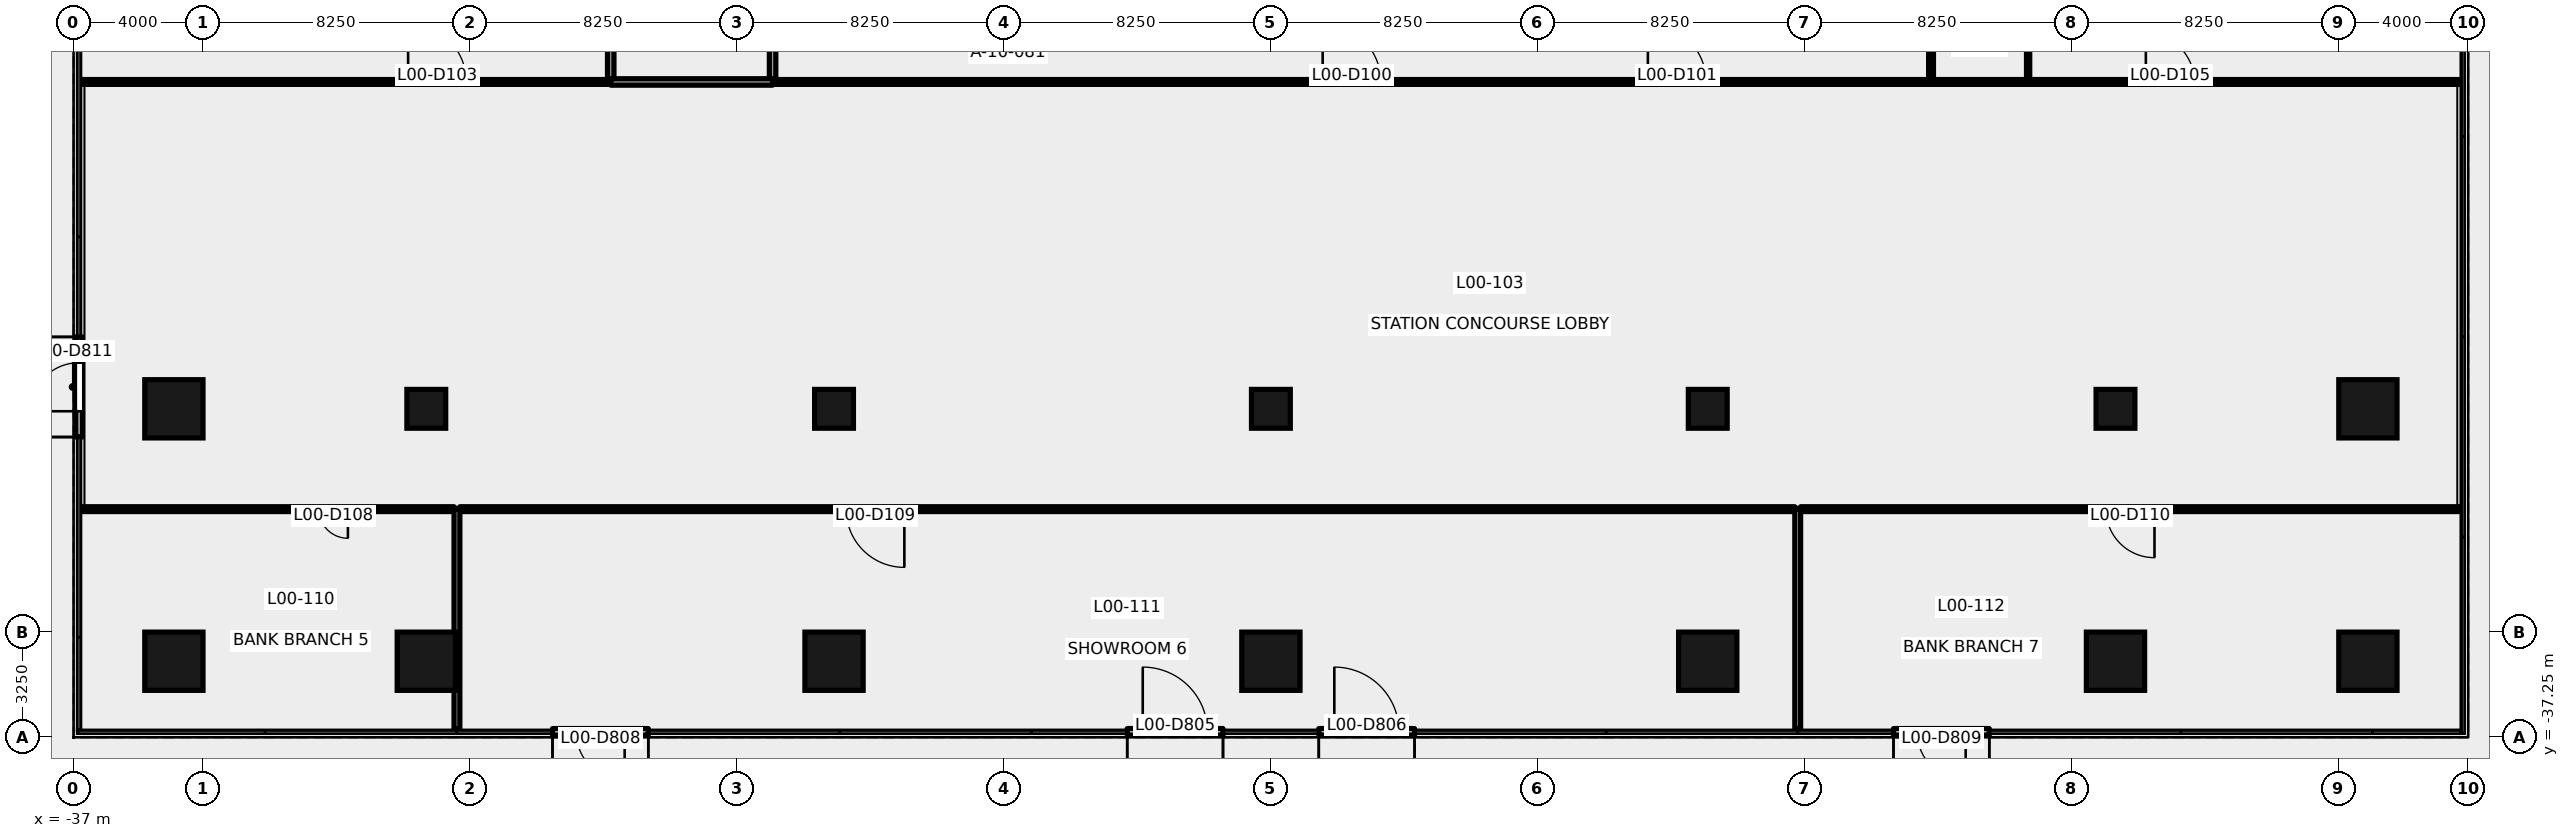
"""IFC4 building model, lengths in metres.
Left out: names, types, materials, properties, quantities, classifications, styles, units other than length and angle.
Written with IfcOpenShell. Run it as: python <this file> out.ifc"""

import sys

from ifc_helpers import new_model, si_unit, direction, frame, frame_2d, origin, origin_2d, place, context, subcontext, project, spatial, rectangle, extrude, element, fill, save


model = new_model("IFC4")
c1 = context("Model", 3, precision=1e-05, world=origin(), true_north=direction((0.0, 1.0)))
c2 = subcontext(c1, "Body", "Model", "MODEL_VIEW")
j1 = project(units=[si_unit("LENGTHUNIT", "METRE"), si_unit("PLANEANGLEUNIT", "RADIAN")], contexts=[c1])
p1 = place(None, origin())
s1 = spatial("IfcSite", under=j1, at=p1, CompositionType="ELEMENT")
p2 = place(p1, origin())
s2 = spatial("IfcBuilding", under=s1, at=p2, CompositionType="ELEMENT")
p3 = place(p2, origin())
s3 = spatial("IfcBuildingStorey", under=s2, at=p3, CompositionType="ELEMENT", Elevation=0.0)
for number, where, z_axis, x_axis in (
    (1, (-33.9, -34.9, -0.2), (0.0, 0.0, 1.0), (1.0, 0.0, 0.0)),
    (2, (33.9, -34.9, -0.2), (0.0, 0.0, 1.0), (1.0, 0.0, 0.0)),
    (3, (-26.1, -34.9, -0.2), (0.0, 0.0, 1.0), (1.0, 0.0, 0.0)),
    (4, (-13.5, -34.9, -0.2), (0.0, 0.0, 1.0), (1.0, 0.0, 0.0)),
    (5, (0.0, -34.9, -0.2), (0.0, 0.0, 1.0), (1.0, 0.0, 0.0)),
    (6, (13.5, -34.9, -0.2), (0.0, 0.0, 1.0), (1.0, 0.0, 0.0)),
    (7, (26.1, -34.9, -0.2), (0.0, 0.0, 1.0), (1.0, 0.0, 0.0)),
    (8, (-33.9, -27.1, -0.2), (0.0, 0.0, 1.0), (0.0, 1.0, 0.0)),
    (9, (33.9, -27.1, -0.2), (0.0, 0.0, 1.0), (0.0, 1.0, 0.0)),
):
    element("IfcColumn", number, at=place(p3, frame(where, z_axis=z_axis, x_axis=x_axis)), inside=s3, PredefinedType="COLUMN", context=c2, shape_type="SweptSolid", body=[
        extrude(rectangle(XDim=1.8, YDim=1.8, at=origin_2d()), origin(), (0.0, 0.0, 1.0), 7.2),
    ])
for number, where, z_axis, x_axis in (
    (10, (-26.1, -27.1, -0.2), (0.0, 0.0, 1.0), (1.0, 0.0, 0.0)),
    (11, (-13.5, -27.1, -0.2), (0.0, 0.0, 1.0), (1.0, 0.0, 0.0)),
    (12, (0.0, -27.1, -0.2), (0.0, 0.0, 1.0), (1.0, 0.0, 0.0)),
    (13, (13.5, -27.1, -0.2), (0.0, 0.0, 1.0), (1.0, 0.0, 0.0)),
    (14, (26.1, -27.1, -0.2), (0.0, 0.0, 1.0), (1.0, 0.0, 0.0)),
):
    element("IfcColumn", number, at=place(p3, frame(where, z_axis=z_axis, x_axis=x_axis)), inside=s3, PredefinedType="COLUMN", context=c2, shape_type="SweptSolid", body=[
        extrude(rectangle(XDim=1.2, YDim=1.2, at=origin_2d()), origin(), (0.0, 0.0, 1.0), 7.2),
    ])
p4 = place(p3, frame((-36.83, -27.972, 0.0), z_axis=(0.0, 0.0, 1.0), x_axis=(0.0, 1.0, 0.0)))
e15 = element("IfcWall", 15, at=p4, inside=s3, PredefinedType="SOLIDWALL", context=c2, shape_type="SweptSolid", body=[
    extrude(rectangle(XDim=3.094, YDim=0.2, at=frame_2d((1.547, 0.0))), origin(), (0.0, 0.0, 1.0), 7.0),
])
p5 = place(p4, frame((0.797, 0.0, 0.0)))
e16 = element("IfcOpeningElement", 16, at=p5, cuts=e15, PredefinedType="OPENING", context=c2, shape_type="SweptSolid", body=[
    extrude(rectangle(XDim=1.5, YDim=2.4, at=frame_2d((0.75, 1.2))), frame((0.0, 0.111, 0.0), z_axis=(0.0, -1.0, 0.0), x_axis=(1.0, 0.0, 0.0)), (0.0, 0.0, 1.0), 0.221),
])
p6 = place(p3, frame((-19.24, -37.08, 0.0), z_axis=(0.0, 0.0, 1.0), x_axis=(-1.0, 0.0, 0.0)))
e17 = element("IfcWall", 17, at=p6, inside=s3, PredefinedType="SOLIDWALL", context=c2, shape_type="SweptSolid", body=[
    extrude(rectangle(XDim=2.96, YDim=0.2, at=frame_2d((1.48, 0.0))), origin(), (0.0, 0.0, 1.0), 7.0),
])
p7 = place(p6, frame((0.73, 0.0, 0.0)))
e18 = element("IfcOpeningElement", 18, at=p7, cuts=e17, PredefinedType="OPENING", context=c2, shape_type="SweptSolid", body=[
    extrude(rectangle(XDim=1.5, YDim=2.4, at=frame_2d((0.75, 1.2))), frame((0.0, 0.111, 0.0), z_axis=(0.0, -1.0, 0.0), x_axis=(1.0, 0.0, 0.0)), (0.0, 0.0, 1.0), 0.221),
])
p8 = place(p3, frame((-4.44, -37.08, 0.0), z_axis=(0.0, 0.0, 1.0), x_axis=(1.0, 0.0, 0.0)))
e19 = element("IfcWall", 19, at=p8, inside=s3, PredefinedType="SOLIDWALL", context=c2, shape_type="SweptSolid", body=[
    extrude(rectangle(XDim=2.96, YDim=0.2, at=frame_2d((1.48, 0.0))), origin(), (0.0, 0.0, 1.0), 7.0),
])
p9 = place(p8, frame((0.48, 0.0, 0.0)))
e20 = element("IfcOpeningElement", 20, at=p9, cuts=e19, PredefinedType="OPENING", context=c2, shape_type="SweptSolid", body=[
    extrude(rectangle(XDim=2.0, YDim=2.4, at=frame_2d((1.0, 1.2))), frame((0.0, 0.111, 0.0), z_axis=(0.0, -1.0, 0.0), x_axis=(1.0, 0.0, 0.0)), (0.0, 0.0, 1.0), 0.221),
])
p10 = place(p3, frame((1.48, -37.08, 0.0), z_axis=(0.0, 0.0, 1.0), x_axis=(1.0, 0.0, 0.0)))
e21 = element("IfcWall", 21, at=p10, inside=s3, PredefinedType="SOLIDWALL", context=c2, shape_type="SweptSolid", body=[
    extrude(rectangle(XDim=2.96, YDim=0.2, at=frame_2d((1.48, 0.0))), origin(), (0.0, 0.0, 1.0), 7.0),
])
p11 = place(p10, frame((0.48, 0.0, 0.0)))
e22 = element("IfcOpeningElement", 22, at=p11, cuts=e21, PredefinedType="OPENING", context=c2, shape_type="SweptSolid", body=[
    extrude(rectangle(XDim=2.0, YDim=2.4, at=frame_2d((1.0, 1.2))), frame((0.0, 0.111, 0.0), z_axis=(0.0, -1.0, 0.0), x_axis=(1.0, 0.0, 0.0)), (0.0, 0.0, 1.0), 0.221),
])
p12 = place(p3, frame((22.2, -37.08, 0.0), z_axis=(0.0, 0.0, 1.0), x_axis=(-1.0, 0.0, 0.0)))
e23 = element("IfcWall", 23, at=p12, inside=s3, PredefinedType="SOLIDWALL", context=c2, shape_type="SweptSolid", body=[
    extrude(rectangle(XDim=2.96, YDim=0.2, at=frame_2d((1.48, 0.0))), origin(), (0.0, 0.0, 1.0), 7.0),
])
p13 = place(p12, frame((0.73, 0.0, 0.0)))
e24 = element("IfcOpeningElement", 24, at=p13, cuts=e23, PredefinedType="OPENING", context=c2, shape_type="SweptSolid", body=[
    extrude(rectangle(XDim=1.5, YDim=2.4, at=frame_2d((0.75, 1.2))), frame((0.0, 0.111, 0.0), z_axis=(0.0, -1.0, 0.0), x_axis=(1.0, 0.0, 0.0)), (0.0, 0.0, 1.0), 0.221),
])
p14 = place(p3, frame((-15.399, -16.9, 0.0), z_axis=(0.0, 0.0, 1.0), x_axis=(0.0, 1.0, 0.0)))
e25 = element("IfcWall", 25, at=p14, inside=s3, PredefinedType="PARTITIONING", context=c2, shape_type="SweptSolid", body=[
    extrude(rectangle(XDim=4.3, YDim=0.2, at=frame_2d((2.15, 0.0))), origin(), (0.0, 0.0, 1.0), 6.0),
])
p15 = place(p3, frame((-15.4, -17.0, 0.0), z_axis=(0.0, 0.0, 1.0), x_axis=(1.0, 0.0, 0.0)))
e26 = element("IfcWall", 26, at=p15, inside=s3, PredefinedType="PARTITIONING", context=c2, shape_type="SweptSolid", body=[
    extrude(rectangle(XDim=35.8, YDim=0.15, at=frame_2d((17.9, 0.0))), origin(), (0.0, 0.0, 1.0), 6.0),
])
p16 = place(p15, frame((17.0, 0.0, 0.0)))
e27 = element("IfcOpeningElement", 27, at=p16, cuts=e26, PredefinedType="OPENING", context=c2, shape_type="SweptSolid", body=[
    extrude(rectangle(XDim=1.8, YDim=2.1, at=frame_2d((0.9, 1.05))), frame((0.0, 0.085, 0.0), z_axis=(0.0, -1.0, 0.0), x_axis=(1.0, 0.0, 0.0)), (0.0, 0.0, 1.0), 0.171),
])
p17 = place(p15, frame((27.05, 0.0, 0.0)))
e28 = element("IfcOpeningElement", 28, at=p17, cuts=e26, PredefinedType="OPENING", context=c2, shape_type="SweptSolid", body=[
    extrude(rectangle(XDim=1.8, YDim=2.1, at=frame_2d((0.9, 1.05))), frame((0.0, 0.085, 0.0), z_axis=(0.0, -1.0, 0.0), x_axis=(1.0, 0.0, 0.0)), (0.0, 0.0, 1.0), 0.171),
])
p18 = place(p3, frame((20.4, -10.979, 0.0), z_axis=(0.0, 0.0, 1.0), x_axis=(0.0, -1.0, 0.0)))
e29 = element("IfcWall", 29, at=p18, inside=s3, PredefinedType="PARTITIONING", context=c2, shape_type="SweptSolid", body=[
    extrude(rectangle(XDim=5.946, YDim=0.15, at=frame_2d((2.973, 0.0))), origin(), (0.0, 0.0, 1.0), 6.0),
])
p19 = place(p3, frame((-15.4, -17.0, 0.0), z_axis=(0.0, 0.0, 1.0), x_axis=(-1.0, 0.0, 0.0)))
e30 = element("IfcWall", 30, at=p19, inside=s3, PredefinedType="PARTITIONING", context=c2, shape_type="SweptSolid", body=[
    extrude(rectangle(XDim=5.0, YDim=0.2, at=frame_2d((2.5, 0.0))), origin(), (0.0, 0.0, 1.0), 6.39),
])
p20 = place(p3, frame((-20.401, -16.9, 0.0), z_axis=(0.0, 0.0, 1.0), x_axis=(0.0, 1.0, 0.0)))
e31 = element("IfcWall", 31, at=p20, inside=s3, PredefinedType="PARTITIONING", context=c2, shape_type="SweptSolid", body=[
    extrude(rectangle(XDim=4.3, YDim=0.2, at=frame_2d((2.15, 0.0))), origin(), (0.0, 0.0, 1.0), 6.0),
])
p21 = place(p3, frame((-36.74, -17.0, 0.0), z_axis=(0.0, 0.0, 1.0), x_axis=(1.0, 0.0, 0.0)))
e32 = element("IfcWall", 32, at=p21, inside=s3, PredefinedType="PARTITIONING", context=c2, shape_type="SweptSolid", body=[
    extrude(rectangle(XDim=16.34, YDim=0.15, at=frame_2d((8.17, 0.0))), origin(), (0.0, 0.0, 1.0), 6.0),
])
p22 = place(p21, frame((10.078, 0.0, 0.0)))
e33 = element("IfcOpeningElement", 33, at=p22, cuts=e32, PredefinedType="OPENING", context=c2, shape_type="SweptSolid", body=[
    extrude(rectangle(XDim=1.8, YDim=2.1, at=frame_2d((0.9, 1.05))), frame((0.0, 0.085, 0.0), z_axis=(0.0, -1.0, 0.0), x_axis=(1.0, 0.0, 0.0)), (0.0, 0.0, 1.0), 0.171),
])
p23 = place(p3, frame((23.38, -17.0, 0.0), z_axis=(0.0, 0.0, 1.0), x_axis=(1.0, 0.0, 0.0)))
e34 = element("IfcWall", 34, at=p23, inside=s3, PredefinedType="PARTITIONING", context=c2, shape_type="SweptSolid", body=[
    extrude(rectangle(XDim=13.36, YDim=0.15, at=frame_2d((6.68, 0.0))), origin(), (0.0, 0.0, 1.0), 6.0),
])
p24 = place(p23, frame((3.658, 0.0, 0.0)))
e35 = element("IfcOpeningElement", 35, at=p24, cuts=e34, PredefinedType="OPENING", context=c2, shape_type="SweptSolid", body=[
    extrude(rectangle(XDim=1.5, YDim=2.1, at=frame_2d((0.75, 1.05))), frame((0.0, 0.085, 0.0), z_axis=(0.0, -1.0, 0.0), x_axis=(1.0, 0.0, 0.0)), (0.0, 0.0, 1.0), 0.171),
])
p25 = place(p3, frame((20.4, -17.0, 0.0), z_axis=(0.0, 0.0, 1.0), x_axis=(1.0, 0.0, 0.0)))
e36 = element("IfcWall", 36, at=p25, inside=s3, PredefinedType="PARTITIONING", context=c2, shape_type="SweptSolid", body=[
    extrude(rectangle(XDim=2.98, YDim=0.15, at=frame_2d((1.49, 0.0))), origin(), (0.0, 0.0, 1.0), 6.39),
])
p26 = place(p3, frame((-25.243, -30.2, 0.0), z_axis=(0.0, 0.0, 1.0), x_axis=(-1.0, 0.0, 0.0)))
e37 = element("IfcWall", 37, at=p26, inside=s3, PredefinedType="PARTITIONING", context=c2, shape_type="SweptSolid", body=[
    extrude(rectangle(XDim=11.497, YDim=0.15, at=frame_2d((5.749, 0.0))), origin(), (0.0, 0.0, 1.0), 6.0),
])
p27 = place(p26, frame((3.279, 0.0, 0.0)))
e38 = element("IfcOpeningElement", 38, at=p27, cuts=e37, PredefinedType="OPENING", context=c2, shape_type="SweptSolid", body=[
    extrude(rectangle(XDim=0.9, YDim=2.1, at=frame_2d((0.45, 1.05))), frame((0.0, 0.085, 0.0), z_axis=(0.0, -1.0, 0.0), x_axis=(1.0, 0.0, 0.0)), (0.0, 0.0, 1.0), 0.171),
])
p28 = place(p3, frame((16.19, -30.2, 0.0), z_axis=(0.0, 0.0, 1.0), x_axis=(-1.0, 0.0, 0.0)))
e39 = element("IfcWall", 39, at=p28, inside=s3, PredefinedType="PARTITIONING", context=c2, shape_type="SweptSolid", body=[
    extrude(rectangle(XDim=41.253, YDim=0.15, at=frame_2d((20.626, 0.0))), origin(), (0.0, 0.0, 1.0), 6.0),
])
p29 = place(p28, frame((27.517, 0.0, 0.0)))
e40 = element("IfcOpeningElement", 40, at=p29, cuts=e39, PredefinedType="OPENING", context=c2, shape_type="SweptSolid", body=[
    extrude(rectangle(XDim=1.8, YDim=2.1, at=frame_2d((0.9, 1.05))), frame((0.0, 0.085, 0.0), z_axis=(0.0, -1.0, 0.0), x_axis=(1.0, 0.0, 0.0)), (0.0, 0.0, 1.0), 0.171),
])
p30 = place(p3, frame((36.74, -30.2, 0.0), z_axis=(0.0, 0.0, 1.0), x_axis=(-1.0, 0.0, 0.0)))
e41 = element("IfcWall", 41, at=p30, inside=s3, PredefinedType="PARTITIONING", context=c2, shape_type="SweptSolid", body=[
    extrude(rectangle(XDim=20.37, YDim=0.15, at=frame_2d((10.185, 0.0))), origin(), (0.0, 0.0, 1.0), 6.0),
])
p31 = place(p30, frame((9.435, 0.0, 0.0)))
e42 = element("IfcOpeningElement", 42, at=p31, cuts=e41, PredefinedType="OPENING", context=c2, shape_type="SweptSolid", body=[
    extrude(rectangle(XDim=1.5, YDim=2.1, at=frame_2d((0.75, 1.05))), frame((0.0, 0.085, 0.0), z_axis=(0.0, -1.0, 0.0), x_axis=(1.0, 0.0, 0.0)), (0.0, 0.0, 1.0), 0.171),
])
p32 = place(p3, frame((23.4, -16.925, 0.0), z_axis=(0.0, 0.0, 1.0), x_axis=(0.0, 1.0, 0.0)))
e43 = element("IfcWall", 43, at=p32, inside=s3, PredefinedType="PARTITIONING", context=c2, shape_type="SweptSolid", body=[
    extrude(rectangle(XDim=5.926, YDim=0.1, at=frame_2d((2.963, 0.0))), origin(), (0.0, 0.0, 1.0), 6.0),
])
p33 = place(p32, frame((2.563, 0.0, 0.0)))
e44 = element("IfcOpeningElement", 44, at=p33, cuts=e43, PredefinedType="OPENING", context=c2, shape_type="SweptSolid", body=[
    extrude(rectangle(XDim=0.8, YDim=2.1, at=frame_2d((0.4, 1.05))), frame((0.0, 0.061, 0.0), z_axis=(0.0, -1.0, 0.0), x_axis=(1.0, 0.0, 0.0)), (0.0, 0.0, 1.0), 0.121),
])
for number, where, z_axis, x_axis in (
    (45, (-25.153, -30.2, 0.0), (0.0, 0.0, 1.0), (0.0, -1.0, 0.0)),
    (46, (16.28, -30.2, 0.0), (0.0, 0.0, 1.0), (0.0, -1.0, 0.0)),
):
    element("IfcWall", number, at=place(p3, frame(where, z_axis=z_axis, x_axis=x_axis)), inside=s3, PredefinedType="PARTITIONING", context=c2, shape_type="SweptSolid", body=[
        extrude(rectangle(XDim=6.79, YDim=0.18, at=frame_2d((3.395, 0.0))), origin(), (0.0, 0.0, 1.0), 6.0),
    ])
p34 = place(p5, origin())
e47 = element("IfcDoor", 47, at=p34, inside=s3, OperationType="DOUBLE_DOOR_SINGLE_SWING", PredefinedType="DOOR", context=c2, shape_type="SweptSolid", body=[
    extrude(rectangle(XDim=1.5, YDim=2.4, at=frame_2d((0.75, 1.2))), frame((0.0, 0.025, 0.0), z_axis=(0.0, -1.0, 0.0), x_axis=(1.0, 0.0, 0.0)), (0.0, 0.0, 1.0), 0.05),
])
fill(e16, e47)
p35 = place(p7, origin())
e48 = element("IfcDoor", 48, at=p35, inside=s3, OperationType="DOUBLE_DOOR_SINGLE_SWING", PredefinedType="DOOR", context=c2, shape_type="SweptSolid", body=[
    extrude(rectangle(XDim=1.5, YDim=2.4, at=frame_2d((0.75, 1.2))), frame((0.0, 0.025, 0.0), z_axis=(0.0, -1.0, 0.0), x_axis=(1.0, 0.0, 0.0)), (0.0, 0.0, 1.0), 0.05),
])
fill(e18, e48)
p36 = place(p9, origin())
e49 = element("IfcDoor", 49, at=p36, inside=s3, OperationType="DOUBLE_DOOR_SINGLE_SWING", PredefinedType="DOOR", context=c2, shape_type="SweptSolid", body=[
    extrude(rectangle(XDim=2.0, YDim=2.4, at=frame_2d((1.0, 1.2))), frame((0.0, 0.025, 0.0), z_axis=(0.0, -1.0, 0.0), x_axis=(1.0, 0.0, 0.0)), (0.0, 0.0, 1.0), 0.05),
])
fill(e20, e49)
p37 = place(p11, origin())
e50 = element("IfcDoor", 50, at=p37, inside=s3, OperationType="DOUBLE_DOOR_SINGLE_SWING", PredefinedType="DOOR", context=c2, shape_type="SweptSolid", body=[
    extrude(rectangle(XDim=2.0, YDim=2.4, at=frame_2d((1.0, 1.2))), frame((0.0, 0.025, 0.0), z_axis=(0.0, -1.0, 0.0), x_axis=(1.0, 0.0, 0.0)), (0.0, 0.0, 1.0), 0.05),
])
fill(e22, e50)
p38 = place(p13, origin())
e51 = element("IfcDoor", 51, at=p38, inside=s3, OperationType="DOUBLE_DOOR_SINGLE_SWING", PredefinedType="DOOR", context=c2, shape_type="SweptSolid", body=[
    extrude(rectangle(XDim=1.5, YDim=2.4, at=frame_2d((0.75, 1.2))), frame((0.0, 0.025, 0.0), z_axis=(0.0, -1.0, 0.0), x_axis=(1.0, 0.0, 0.0)), (0.0, 0.0, 1.0), 0.05),
])
fill(e24, e51)
p39 = place(p16, origin())
e52 = element("IfcDoor", 52, at=p39, inside=s3, OperationType="DOUBLE_DOOR_SINGLE_SWING", PredefinedType="DOOR", context=c2, shape_type="SweptSolid", body=[
    extrude(rectangle(XDim=1.8, YDim=2.1, at=frame_2d((0.9, 1.05))), frame((0.0, 0.025, 0.0), z_axis=(0.0, -1.0, 0.0), x_axis=(1.0, 0.0, 0.0)), (0.0, 0.0, 1.0), 0.05),
])
fill(e27, e52)
p40 = place(p17, origin())
e53 = element("IfcDoor", 53, at=p40, inside=s3, OperationType="DOUBLE_DOOR_SINGLE_SWING", PredefinedType="DOOR", context=c2, shape_type="SweptSolid", body=[
    extrude(rectangle(XDim=1.8, YDim=2.1, at=frame_2d((0.9, 1.05))), frame((0.0, 0.025, 0.0), z_axis=(0.0, -1.0, 0.0), x_axis=(1.0, 0.0, 0.0)), (0.0, 0.0, 1.0), 0.05),
])
fill(e28, e53)
p41 = place(p22, origin())
e54 = element("IfcDoor", 54, at=p41, inside=s3, OperationType="DOUBLE_DOOR_SINGLE_SWING", PredefinedType="DOOR", context=c2, shape_type="SweptSolid", body=[
    extrude(rectangle(XDim=1.8, YDim=2.1, at=frame_2d((0.9, 1.05))), frame((0.0, 0.025, 0.0), z_axis=(0.0, -1.0, 0.0), x_axis=(1.0, 0.0, 0.0)), (0.0, 0.0, 1.0), 0.05),
])
fill(e33, e54)
p42 = place(p24, origin())
e55 = element("IfcDoor", 55, at=p42, inside=s3, OperationType="DOUBLE_DOOR_SINGLE_SWING", PredefinedType="DOOR", context=c2, shape_type="SweptSolid", body=[
    extrude(rectangle(XDim=1.5, YDim=2.1, at=frame_2d((0.75, 1.05))), frame((0.0, 0.025, 0.0), z_axis=(0.0, -1.0, 0.0), x_axis=(1.0, 0.0, 0.0)), (0.0, 0.0, 1.0), 0.05),
])
fill(e35, e55)
p43 = place(p27, origin())
e56 = element("IfcDoor", 56, at=p43, inside=s3, OperationType="SINGLE_SWING_LEFT", PredefinedType="DOOR", context=c2, shape_type="SweptSolid", body=[
    extrude(rectangle(XDim=0.9, YDim=2.1, at=frame_2d((0.45, 1.05))), frame((0.0, 0.025, 0.0), z_axis=(0.0, -1.0, 0.0), x_axis=(1.0, 0.0, 0.0)), (0.0, 0.0, 1.0), 0.05),
])
fill(e38, e56)
p44 = place(p29, origin())
e57 = element("IfcDoor", 57, at=p44, inside=s3, OperationType="DOUBLE_DOOR_SINGLE_SWING", PredefinedType="DOOR", context=c2, shape_type="SweptSolid", body=[
    extrude(rectangle(XDim=1.8, YDim=2.1, at=frame_2d((0.9, 1.05))), frame((0.0, 0.025, 0.0), z_axis=(0.0, -1.0, 0.0), x_axis=(1.0, 0.0, 0.0)), (0.0, 0.0, 1.0), 0.05),
])
fill(e40, e57)
p45 = place(p31, origin())
e58 = element("IfcDoor", 58, at=p45, inside=s3, OperationType="DOUBLE_DOOR_SINGLE_SWING", PredefinedType="DOOR", context=c2, shape_type="SweptSolid", body=[
    extrude(rectangle(XDim=1.5, YDim=2.1, at=frame_2d((0.75, 1.05))), frame((0.0, 0.025, 0.0), z_axis=(0.0, -1.0, 0.0), x_axis=(1.0, 0.0, 0.0)), (0.0, 0.0, 1.0), 0.05),
])
fill(e42, e58)
save(model, sys.argv[1])
